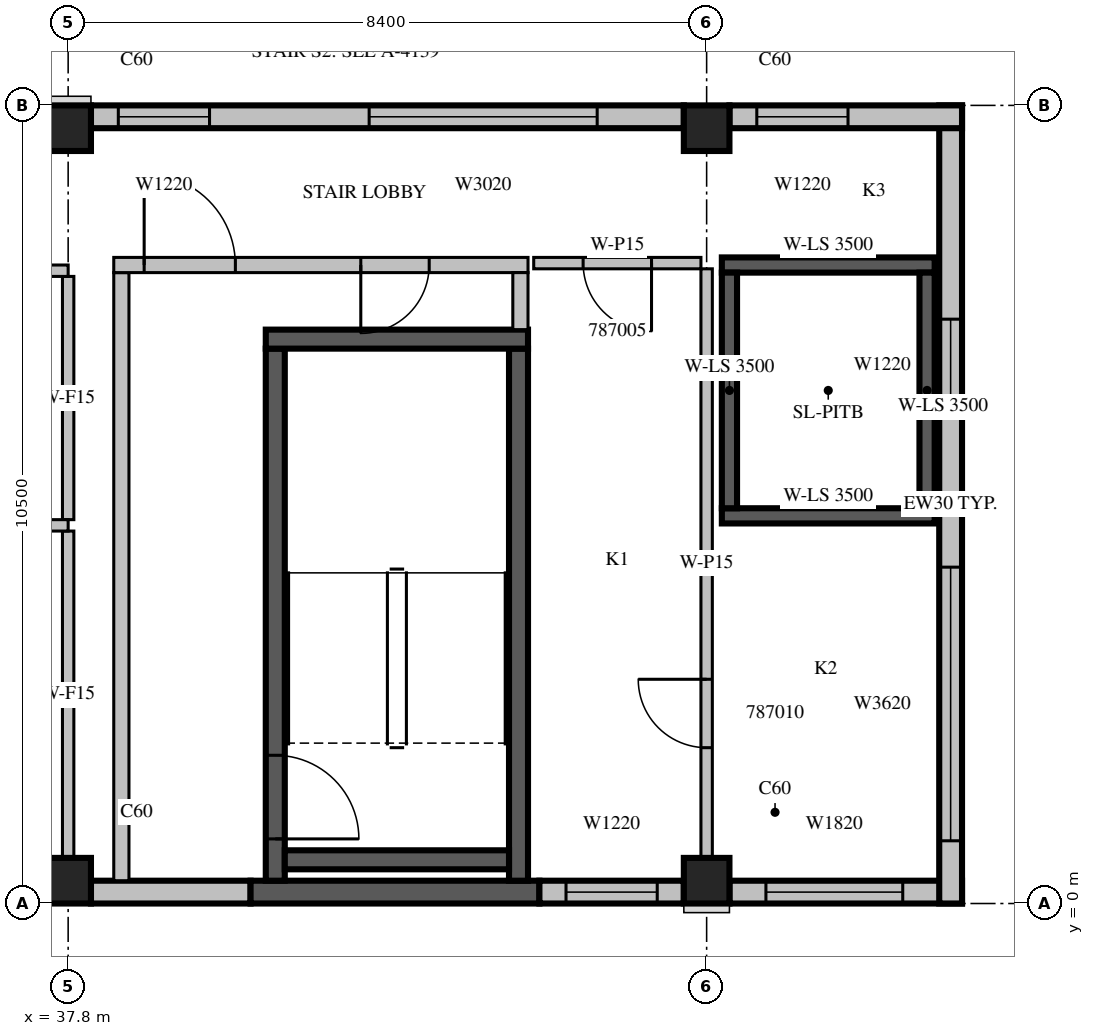
"""IFC4 building model, lengths in metres.
Left out: names, types, materials, properties, quantities, classifications, styles, units other than length and angle.
Written with IfcOpenShell. Run it as: python <this file> out.ifc"""

import sys

from ifc_helpers import new_model, si_unit, direction, frame, frame_2d, origin, origin_2d, place, context, subcontext, project, spatial, rectangle, extrude, source, transform, mapped, element, fill, save


model = new_model("IFC4")
c1 = context("Model", 3, precision=1e-05, world=origin(), true_north=direction((0.0, 1.0)))
c2 = subcontext(c1, "Body", "Model", "MODEL_VIEW")
j1 = project(units=[si_unit("LENGTHUNIT", "METRE"), si_unit("PLANEANGLEUNIT", "RADIAN")], contexts=[c1])
p1 = place(None, origin())
s1 = spatial("IfcSite", under=j1, at=p1, CompositionType="ELEMENT")
p2 = place(p1, origin())
s2 = spatial("IfcBuilding", under=s1, at=p2, CompositionType="ELEMENT")
p3 = place(p2, frame((0.0, 0.0, 365.0)))
s3 = spatial("IfcBuildingStorey", under=s2, at=p3, CompositionType="ELEMENT", Elevation=365.0)
m1 = source(origin(), c2, "Body", "SweptSolid", [
    extrude(rectangle(XDim=0.6, YDim=0.6, at=origin_2d()), origin(), (0.0, 0.0, 1.0), 3.5),
])
for number, where, z_axis, x_axis in (
    (1, (37.8, 0.3, 0.0), (0.0, 0.0, 1.0), (1.0, 0.0, 0.0)),
    (2, (46.2, 0.3, 0.0), (0.0, 0.0, 1.0), (1.0, 0.0, 0.0)),
    (3, (37.8, 10.2, 0.0), (0.0, 0.0, 1.0), (1.0, 0.0, 0.0)),
    (4, (46.2, 10.2, 0.0), (0.0, 0.0, 1.0), (1.0, 0.0, 0.0)),
):
    element("IfcColumn", number, at=place(p3, frame(where, z_axis=z_axis, x_axis=x_axis)), inside=s3, PredefinedType="COLUMN", context=c2, shape_type="MappedRepresentation", body=[
        mapped(m1, transform((0.0, 0.0, 0.0), scale=1.0)),
    ])
p4 = place(p3, frame((38.1, 0.15, 0.0), z_axis=(0.0, 0.0, 1.0), x_axis=(1.0, 0.0, 0.0)))
e5 = element("IfcWall", 5, at=p4, inside=s3, PredefinedType="STANDARD", context=c2, shape_type="SweptSolid", body=[
    extrude(rectangle(XDim=2.1, YDim=0.3, at=frame_2d((1.05, 0.0))), origin(), (0.0, 0.0, 1.0), 3.05),
])
p5 = place(p3, frame((40.2, 0.15, 0.0), z_axis=(0.0, 0.0, 1.0), x_axis=(1.0, 0.0, 0.0)))
e6 = element("IfcWall", 6, at=p5, inside=s3, PredefinedType="SOLIDWALL", context=c2, shape_type="SweptSolid", body=[
    extrude(rectangle(XDim=3.8, YDim=0.3, at=frame_2d((1.9, 0.0))), origin(), (0.0, 0.0, 1.0), 3.05),
])
p6 = place(p3, frame((44.0, 0.15, 0.0), z_axis=(0.0, 0.0, 1.0), x_axis=(1.0, 0.0, 0.0)))
e7 = element("IfcWall", 7, at=p6, inside=s3, PredefinedType="STANDARD", context=c2, shape_type="SweptSolid", body=[
    extrude(rectangle(XDim=1.9, YDim=0.3, at=frame_2d((0.95, 0.0))), origin(), (0.0, 0.0, 1.0), 3.05),
])
m2 = source(origin(), c2, "Body", "SweptSolid", [
    extrude(rectangle(XDim=1.2, YDim=2.0, at=frame_2d((0.6, 1.0))), frame((0.0, 0.16, 0.0), z_axis=(0.0, -1.0, 0.0), x_axis=(1.0, 0.0, 0.0)), (0.0, 0.0, 1.0), 0.32),
])
p7 = place(p6, frame((0.35, 0.0, 0.6)))
e8 = element("IfcOpeningElement", 8, at=p7, cuts=e7, PredefinedType="OPENING", context=c2, shape_type="MappedRepresentation", body=[
    mapped(m2, transform((0.0, 0.0, 0.0), scale=1.0)),
])
p8 = place(p3, frame((46.5, 0.15, 0.0), z_axis=(0.0, 0.0, 1.0), x_axis=(1.0, 0.0, 0.0)))
e9 = element("IfcWall", 9, at=p8, inside=s3, PredefinedType="STANDARD", context=c2, shape_type="SweptSolid", body=[
    extrude(rectangle(XDim=3.06, YDim=0.3, at=frame_2d((1.53, 0.0))), origin(), (0.0, 0.0, 1.0), 3.05),
])
m3 = source(origin(), c2, "Body", "SweptSolid", [
    extrude(rectangle(XDim=1.8, YDim=2.0, at=frame_2d((0.9, 1.0))), frame((0.0, 0.16, 0.0), z_axis=(0.0, -1.0, 0.0), x_axis=(1.0, 0.0, 0.0)), (0.0, 0.0, 1.0), 0.32),
])
p9 = place(p8, frame((0.48, 0.0, 0.6)))
e10 = element("IfcOpeningElement", 10, at=p9, cuts=e9, PredefinedType="OPENING", context=c2, shape_type="MappedRepresentation", body=[
    mapped(m3, transform((0.0, 0.0, 0.0), scale=1.0)),
])
p10 = place(p3, frame((49.41, 0.0, 0.0), z_axis=(0.0, 0.0, 1.0), x_axis=(0.0, 1.0, 0.0)))
e11 = element("IfcWall", 11, at=p10, inside=s3, PredefinedType="STANDARD", context=c2, shape_type="SweptSolid", body=[
    extrude(rectangle(XDim=10.5, YDim=0.3, at=frame_2d((5.25, 0.0))), origin(), (0.0, 0.0, 1.0), 3.05),
])
m4 = source(origin(), c2, "Body", "SweptSolid", [
    extrude(rectangle(XDim=3.6, YDim=2.0, at=frame_2d((1.8, 1.0))), frame((0.0, 0.16, 0.0), z_axis=(0.0, -1.0, 0.0), x_axis=(1.0, 0.0, 0.0)), (0.0, 0.0, 1.0), 0.32),
])
p11 = place(p10, frame((0.825, 0.0, 0.6)))
e12 = element("IfcOpeningElement", 12, at=p11, cuts=e11, PredefinedType="OPENING", context=c2, shape_type="MappedRepresentation", body=[
    mapped(m4, transform((0.0, 0.0, 0.0), scale=1.0)),
])
p12 = place(p10, frame((6.487, 0.0, 0.6)))
e13 = element("IfcOpeningElement", 13, at=p12, cuts=e11, PredefinedType="OPENING", context=c2, shape_type="MappedRepresentation", body=[
    mapped(m2, transform((0.0, 0.0, 0.0), scale=1.0)),
])
m5 = source(origin(), c2, "Body", "SweptSolid", [
    extrude(rectangle(XDim=3.06, YDim=0.3, at=frame_2d((1.53, 0.0))), origin(), (0.0, 0.0, 1.0), 3.05),
])
p13 = place(p3, frame((49.56, 10.35, 0.0), z_axis=(0.0, 0.0, 1.0), x_axis=(-1.0, 0.0, 0.0)))
e14 = element("IfcWall", 14, at=p13, inside=s3, PredefinedType="STANDARD", context=c2, shape_type="MappedRepresentation", body=[
    mapped(m5, transform((0.0, 0.0, 0.0), scale=1.0)),
])
p14 = place(p13, frame((1.5, 0.0, 0.6)))
e15 = element("IfcOpeningElement", 15, at=p14, cuts=e14, PredefinedType="OPENING", context=c2, shape_type="MappedRepresentation", body=[
    mapped(m2, transform((0.0, 0.0, 0.0), scale=1.0)),
])
m6 = source(origin(), c2, "Body", "SweptSolid", [
    extrude(rectangle(XDim=7.8, YDim=0.3, at=frame_2d((3.9, 0.0))), origin(), (0.0, 0.0, 1.0), 3.05),
])
p15 = place(p3, frame((45.9, 10.35, 0.0), z_axis=(0.0, 0.0, 1.0), x_axis=(-1.0, 0.0, 0.0)))
e16 = element("IfcWall", 16, at=p15, inside=s3, PredefinedType="STANDARD", context=c2, shape_type="MappedRepresentation", body=[
    mapped(m6, transform((0.0, 0.0, 0.0), scale=1.0)),
])
m7 = source(origin(), c2, "Body", "SweptSolid", [
    extrude(rectangle(XDim=3.0, YDim=2.0, at=frame_2d((1.5, 1.0))), frame((0.0, 0.16, 0.0), z_axis=(0.0, -1.0, 0.0), x_axis=(1.0, 0.0, 0.0)), (0.0, 0.0, 1.0), 0.32),
])
p16 = place(p15, frame((1.14, 0.0, 0.6)))
e17 = element("IfcOpeningElement", 17, at=p16, cuts=e16, PredefinedType="OPENING", context=c2, shape_type="MappedRepresentation", body=[
    mapped(m7, transform((0.0, 0.0, 0.0), scale=1.0)),
])
p17 = place(p15, frame((6.24, 0.0, 0.6)))
e18 = element("IfcOpeningElement", 18, at=p17, cuts=e16, PredefinedType="OPENING", context=c2, shape_type="MappedRepresentation", body=[
    mapped(m2, transform((0.0, 0.0, 0.0), scale=1.0)),
])
p18 = place(p3, frame((46.4, 5.1, 0.0), z_axis=(0.0, 0.0, 1.0), x_axis=(1.0, 0.0, 0.0)))
e19 = element("IfcWall", 19, at=p18, inside=s3, PredefinedType="SOLIDWALL", context=c2, shape_type="SweptSolid", body=[
    extrude(rectangle(XDim=2.8, YDim=0.2, at=frame_2d((1.4, 0.0))), origin(), (0.0, 0.0, 1.0), 3.5),
])
m8 = source(origin(), c2, "Body", "SweptSolid", [
    extrude(rectangle(XDim=2.8, YDim=0.2, at=frame_2d((1.4, 0.0))), origin(), (0.0, 0.0, 1.0), 3.5),
])
p19 = place(p3, frame((46.4, 8.4, 0.0), z_axis=(0.0, 0.0, 1.0), x_axis=(1.0, 0.0, 0.0)))
e20 = element("IfcWall", 20, at=p19, inside=s3, PredefinedType="SOLIDWALL", context=c2, shape_type="MappedRepresentation", body=[
    mapped(m8, transform((0.0, 0.0, 0.0), scale=1.0)),
])
m9 = source(origin(), c2, "Body", "SweptSolid", [
    extrude(rectangle(XDim=3.1, YDim=0.2, at=frame_2d((1.55, 0.0))), origin(), (0.0, 0.0, 1.0), 3.5),
])
for number, where, z_axis, x_axis in (
    (21, (46.5, 5.2, 0.0), (0.0, 0.0, 1.0), (0.0, 1.0, 0.0)),
    (22, (49.1, 5.2, 0.0), (0.0, 0.0, 1.0), (0.0, 1.0, 0.0)),
):
    element("IfcWall", number, at=place(p3, frame(where, z_axis=z_axis, x_axis=x_axis)), inside=s3, PredefinedType="SOLIDWALL", context=c2, shape_type="MappedRepresentation", body=[
        mapped(m9, transform((0.0, 0.0, 0.0), scale=1.0)),
    ])
p20 = place(p3, frame((40.525, 0.3, 0.0), z_axis=(0.0, 0.0, 1.0), x_axis=(0.0, 1.0, 0.0)))
e23 = element("IfcWall", 23, at=p20, inside=s3, PredefinedType="SOLIDWALL", context=c2, shape_type="SweptSolid", body=[
    extrude(rectangle(XDim=7.0, YDim=0.25, at=frame_2d((3.5, 0.0))), origin(), (0.0, 0.0, 1.0), 3.05),
])
m10 = source(origin(), c2, "Body", "SweptSolid", [
    extrude(rectangle(XDim=1.1, YDim=2.1, at=frame_2d((0.55, 1.05))), frame((0.0, 0.135, 0.0), z_axis=(0.0, -1.0, 0.0), x_axis=(1.0, 0.0, 0.0)), (0.0, 0.0, 1.0), 0.27),
])
p21 = place(p20, frame((0.55, 0.0, 0.0)))
e24 = element("IfcOpeningElement", 24, at=p21, cuts=e23, PredefinedType="OPENING", context=c2, shape_type="MappedRepresentation", body=[
    mapped(m10, transform((0.0, 0.0, 0.0), scale=1.0)),
])
m11 = source(origin(), c2, "Body", "SweptSolid", [
    extrude(rectangle(XDim=7.0, YDim=0.25, at=frame_2d((3.5, 0.0))), origin(), (0.0, 0.0, 1.0), 3.05),
])
p22 = place(p3, frame((43.725, 0.3, 0.0), z_axis=(0.0, 0.0, 1.0), x_axis=(0.0, 1.0, 0.0)))
e25 = element("IfcWall", 25, at=p22, inside=s3, PredefinedType="SOLIDWALL", context=c2, shape_type="MappedRepresentation", body=[
    mapped(m11, transform((0.0, 0.0, 0.0), scale=1.0)),
])
p23 = place(p3, frame((40.4, 7.425, 0.0), z_axis=(0.0, 0.0, 1.0), x_axis=(1.0, 0.0, 0.0)))
e26 = element("IfcWall", 26, at=p23, inside=s3, PredefinedType="SOLIDWALL", context=c2, shape_type="SweptSolid", body=[
    extrude(rectangle(XDim=3.45, YDim=0.25, at=frame_2d((1.725, 0.0))), origin(), (0.0, 0.0, 1.0), 3.05),
])
p24 = place(p3, frame((40.65, 0.575, 0.0), z_axis=(0.0, 0.0, 1.0), x_axis=(1.0, 0.0, 0.0)))
e27 = element("IfcWall", 27, at=p24, inside=s3, PredefinedType="SOLIDWALL", context=c2, shape_type="SweptSolid", body=[
    extrude(rectangle(XDim=2.95, YDim=0.25, at=frame_2d((1.475, 0.0))), origin(), (0.0, 0.0, 1.0), 3.05),
])
p25 = place(p3, frame((38.5, 0.3, 0.0), z_axis=(0.0, 0.0, 1.0), x_axis=(0.0, 1.0, 0.0)))
e28 = element("IfcWall", 28, at=p25, inside=s3, PredefinedType="PARTITIONING", context=c2, shape_type="SweptSolid", body=[
    extrude(rectangle(XDim=8.0, YDim=0.2, at=frame_2d((4.0, 0.0))), origin(), (0.0, 0.0, 1.0), 3.05),
])
p26 = place(p3, frame((38.4, 8.4, 0.0), z_axis=(0.0, 0.0, 1.0), x_axis=(1.0, 0.0, 0.0)))
e29 = element("IfcWall", 29, at=p26, inside=s3, PredefinedType="PARTITIONING", context=c2, shape_type="SweptSolid", body=[
    extrude(rectangle(XDim=5.45, YDim=0.2, at=frame_2d((2.725, 0.0))), origin(), (0.0, 0.0, 1.0), 3.05),
])
m12 = source(origin(), c2, "Body", "SweptSolid", [
    extrude(rectangle(XDim=1.2, YDim=2.1, at=frame_2d((0.6, 1.05))), frame((0.0, 0.11, 0.0), z_axis=(0.0, -1.0, 0.0), x_axis=(1.0, 0.0, 0.0)), (0.0, 0.0, 1.0), 0.22),
])
p27 = place(p26, frame((0.4, 0.0, 0.0)))
e30 = element("IfcOpeningElement", 30, at=p27, cuts=e29, PredefinedType="OPENING", context=c2, shape_type="MappedRepresentation", body=[
    mapped(m12, transform((0.0, 0.0, 0.0), scale=1.0)),
])
m13 = source(origin(), c2, "Body", "SweptSolid", [
    extrude(rectangle(XDim=0.9, YDim=2.1, at=frame_2d((0.45, 1.05))), frame((0.0, 0.11, 0.0), z_axis=(0.0, -1.0, 0.0), x_axis=(1.0, 0.0, 0.0)), (0.0, 0.0, 1.0), 0.22),
])
p28 = place(p26, frame((3.25, 0.0, 0.0)))
e31 = element("IfcOpeningElement", 31, at=p28, cuts=e29, PredefinedType="OPENING", context=c2, shape_type="MappedRepresentation", body=[
    mapped(m13, transform((0.0, 0.0, 0.0), scale=1.0)),
])
p29 = place(p3, frame((43.75, 7.55, 0.0), z_axis=(0.0, 0.0, 1.0), x_axis=(0.0, 1.0, 0.0)))
e32 = element("IfcWall", 32, at=p29, inside=s3, PredefinedType="PARTITIONING", context=c2, shape_type="SweptSolid", body=[
    extrude(rectangle(XDim=0.75, YDim=0.2, at=frame_2d((0.375, 0.0))), origin(), (0.0, 0.0, 1.0), 3.05),
])
p30 = place(p3, frame((46.125, 8.425, 0.0), z_axis=(0.0, 0.0, 1.0), x_axis=(-1.0, 0.0, 0.0)))
e33 = element("IfcWall", 33, at=p30, inside=s3, PredefinedType="PARTITIONING", context=c2, shape_type="SweptSolid", body=[
    extrude(rectangle(XDim=2.2, YDim=0.15, at=frame_2d((1.1, 0.0))), origin(), (0.0, 0.0, 1.0), 3.05),
])
m14 = source(origin(), c2, "Body", "SweptSolid", [
    extrude(rectangle(XDim=0.9, YDim=2.1, at=frame_2d((0.45, 1.05))), frame((0.0, 0.085, 0.0), z_axis=(0.0, -1.0, 0.0), x_axis=(1.0, 0.0, 0.0)), (0.0, 0.0, 1.0), 0.17),
])
p31 = place(p30, frame((0.65, 0.0, 0.0)))
e34 = element("IfcOpeningElement", 34, at=p31, cuts=e33, PredefinedType="OPENING", context=c2, shape_type="MappedRepresentation", body=[
    mapped(m14, transform((0.0, 0.0, 0.0), scale=1.0)),
])
p32 = place(p3, frame((37.8, 0.599, 0.0), z_axis=(0.0, 0.0, 1.0), x_axis=(0.0, 1.0, 0.0)))
e35 = element("IfcWall", 35, at=p32, inside=s3, PredefinedType="PARTITIONING", context=c2, shape_type="SweptSolid", body=[
    extrude(rectangle(XDim=4.301, YDim=0.15, at=frame_2d((2.151, 0.0))), origin(), (0.0, 0.0, 1.0), 3.05),
])
m15 = source(origin(), c2, "Body", "SweptSolid", [
    extrude(rectangle(XDim=3.2, YDim=0.15, at=frame_2d((1.6, 0.0))), origin(), (0.0, 0.0, 1.0), 3.05),
])
p33 = place(p3, frame((37.8, 5.05, 0.0), z_axis=(0.0, 0.0, 1.0), x_axis=(0.0, 1.0, 0.0)))
e36 = element("IfcWall", 36, at=p33, inside=s3, PredefinedType="PARTITIONING", context=c2, shape_type="MappedRepresentation", body=[
    mapped(m15, transform((0.0, 0.0, 0.0), scale=1.0)),
])
p34 = place(p3, frame((37.8, 4.975, 0.0), z_axis=(0.0, 0.0, 1.0), x_axis=(-1.0, 0.0, 0.0)))
e37 = element("IfcWall", 37, at=p34, inside=s3, PredefinedType="PARTITIONING", context=c2, shape_type="SweptSolid", body=[
    extrude(rectangle(XDim=8.4, YDim=0.15, at=frame_2d((4.2, 0.0))), origin(), (0.0, 0.0, 1.0), 3.05),
])
m16 = source(origin(), c2, "Body", "SweptSolid", [
    extrude(rectangle(XDim=1.0, YDim=2.1, at=frame_2d((0.5, 1.05))), frame((0.0, 0.085, 0.0), z_axis=(0.0, -1.0, 0.0), x_axis=(1.0, 0.0, 0.0)), (0.0, 0.0, 1.0), 0.17),
])
p35 = place(p34, frame((3.608, 0.0, 0.0)))
e38 = element("IfcOpeningElement", 38, at=p35, cuts=e37, PredefinedType="OPENING", context=c2, shape_type="MappedRepresentation", body=[
    mapped(m16, transform((0.0, 0.0, 0.0), scale=1.0)),
])
p36 = place(p3, frame((46.2, 8.35, 0.0), z_axis=(0.0, 0.0, 1.0), x_axis=(0.0, -1.0, 0.0)))
e39 = element("IfcWall", 39, at=p36, inside=s3, PredefinedType="PARTITIONING", context=c2, shape_type="SweptSolid", body=[
    extrude(rectangle(XDim=7.751, YDim=0.15, at=frame_2d((3.876, 0.0))), origin(), (0.0, 0.0, 1.0), 3.05),
])
p37 = place(p36, frame((5.4, 0.0, 0.0)))
e40 = element("IfcOpeningElement", 40, at=p37, cuts=e39, PredefinedType="OPENING", context=c2, shape_type="MappedRepresentation", body=[
    mapped(m14, transform((0.0, 0.0, 0.0), scale=1.0)),
])
m17 = source(origin(), c2, "Body", "SweptSolid", [
    extrude(rectangle(XDim=8.4, YDim=0.15, at=frame_2d((4.2, 0.0))), origin(), (0.0, 0.0, 1.0), 3.05),
])
p38 = place(p3, frame((37.8, 8.325, 0.0), z_axis=(0.0, 0.0, 1.0), x_axis=(-1.0, 0.0, 0.0)))
e41 = element("IfcWall", 41, at=p38, inside=s3, PredefinedType="PARTITIONING", context=c2, shape_type="MappedRepresentation", body=[
    mapped(m17, transform((0.0, 0.0, 0.0), scale=1.0)),
])
p39 = place(p38, frame((3.658, 0.0, 0.0)))
e42 = element("IfcOpeningElement", 42, at=p39, cuts=e41, PredefinedType="OPENING", context=c2, shape_type="MappedRepresentation", body=[
    mapped(m16, transform((0.0, 0.0, 0.0), scale=1.0)),
])
m18 = source(origin(), c2, "Body", "SweptSolid", [
    extrude(rectangle(XDim=1.2, YDim=2.0, at=frame_2d((0.6, 1.0))), frame((0.0, 0.03, 0.0), z_axis=(0.0, -1.0, 0.0), x_axis=(1.0, 0.0, 0.0)), (0.0, 0.0, 1.0), 0.06),
])
p40 = place(p7, origin())
e43 = element("IfcWindow", 43, at=p40, inside=s3, PartitioningType="SINGLE_PANEL", PredefinedType="WINDOW", context=c2, shape_type="MappedRepresentation", body=[
    mapped(m18, transform((0.0, 0.0, 0.0), scale=1.0)),
])
fill(e8, e43)
m19 = source(origin(), c2, "Body", "SweptSolid", [
    extrude(rectangle(XDim=1.8, YDim=2.0, at=frame_2d((0.9, 1.0))), frame((0.0, 0.03, 0.0), z_axis=(0.0, -1.0, 0.0), x_axis=(1.0, 0.0, 0.0)), (0.0, 0.0, 1.0), 0.06),
])
p41 = place(p9, origin())
e44 = element("IfcWindow", 44, at=p41, inside=s3, PartitioningType="SINGLE_PANEL", PredefinedType="WINDOW", context=c2, shape_type="MappedRepresentation", body=[
    mapped(m19, transform((0.0, 0.0, 0.0), scale=1.0)),
])
fill(e10, e44)
m20 = source(origin(), c2, "Body", "SweptSolid", [
    extrude(rectangle(XDim=3.6, YDim=2.0, at=frame_2d((1.8, 1.0))), frame((0.0, 0.03, 0.0), z_axis=(0.0, -1.0, 0.0), x_axis=(1.0, 0.0, 0.0)), (0.0, 0.0, 1.0), 0.06),
])
p42 = place(p11, origin())
e45 = element("IfcWindow", 45, at=p42, inside=s3, PartitioningType="SINGLE_PANEL", PredefinedType="WINDOW", context=c2, shape_type="MappedRepresentation", body=[
    mapped(m20, transform((0.0, 0.0, 0.0), scale=1.0)),
])
fill(e12, e45)
p43 = place(p12, origin())
e46 = element("IfcWindow", 46, at=p43, inside=s3, PartitioningType="SINGLE_PANEL", PredefinedType="WINDOW", context=c2, shape_type="MappedRepresentation", body=[
    mapped(m18, transform((0.0, 0.0, 0.0), scale=1.0)),
])
fill(e13, e46)
p44 = place(p14, origin())
e47 = element("IfcWindow", 47, at=p44, inside=s3, PartitioningType="SINGLE_PANEL", PredefinedType="WINDOW", context=c2, shape_type="MappedRepresentation", body=[
    mapped(m18, transform((0.0, 0.0, 0.0), scale=1.0)),
])
fill(e15, e47)
m21 = source(origin(), c2, "Body", "SweptSolid", [
    extrude(rectangle(XDim=3.0, YDim=2.0, at=frame_2d((1.5, 1.0))), frame((0.0, 0.03, 0.0), z_axis=(0.0, -1.0, 0.0), x_axis=(1.0, 0.0, 0.0)), (0.0, 0.0, 1.0), 0.06),
])
p45 = place(p16, origin())
e48 = element("IfcWindow", 48, at=p45, inside=s3, PartitioningType="SINGLE_PANEL", PredefinedType="WINDOW", context=c2, shape_type="MappedRepresentation", body=[
    mapped(m21, transform((0.0, 0.0, 0.0), scale=1.0)),
])
fill(e17, e48)
p46 = place(p17, origin())
e49 = element("IfcWindow", 49, at=p46, inside=s3, PartitioningType="SINGLE_PANEL", PredefinedType="WINDOW", context=c2, shape_type="MappedRepresentation", body=[
    mapped(m18, transform((0.0, 0.0, 0.0), scale=1.0)),
])
fill(e18, e49)
m22 = source(origin(), c2, "Body", "SweptSolid", [
    extrude(rectangle(XDim=1.1, YDim=2.1, at=frame_2d((0.55, 1.05))), frame((0.0, 0.025, 0.0), z_axis=(0.0, -1.0, 0.0), x_axis=(1.0, 0.0, 0.0)), (0.0, 0.0, 1.0), 0.05),
])
p47 = place(p21, origin())
e50 = element("IfcDoor", 50, at=p47, inside=s3, OperationType="SINGLE_SWING_RIGHT", PredefinedType="DOOR", context=c2, shape_type="MappedRepresentation", body=[
    mapped(m22, transform((0.0, 0.0, 0.0), scale=1.0)),
])
fill(e24, e50)
m23 = source(origin(), c2, "Body", "SweptSolid", [
    extrude(rectangle(XDim=1.2, YDim=2.1, at=frame_2d((0.6, 1.05))), frame((0.0, 0.025, 0.0), z_axis=(0.0, -1.0, 0.0), x_axis=(1.0, 0.0, 0.0)), (0.0, 0.0, 1.0), 0.05),
])
p48 = place(p27, origin())
e51 = element("IfcDoor", 51, at=p48, inside=s3, OperationType="SINGLE_SWING_LEFT", PredefinedType="DOOR", context=c2, shape_type="MappedRepresentation", body=[
    mapped(m23, transform((0.0, 0.0, 0.0), scale=1.0)),
])
fill(e30, e51)
m24 = source(origin(), c2, "Body", "SweptSolid", [
    extrude(rectangle(XDim=0.9, YDim=2.1, at=frame_2d((0.45, 1.05))), frame((0.0, 0.025, 0.0), z_axis=(0.0, -1.0, 0.0), x_axis=(1.0, 0.0, 0.0)), (0.0, 0.0, 1.0), 0.05),
])
p49 = place(p28, origin())
e52 = element("IfcDoor", 52, at=p49, inside=s3, OperationType="SINGLE_SWING_RIGHT", PredefinedType="DOOR", context=c2, shape_type="MappedRepresentation", body=[
    mapped(m24, transform((0.0, 0.0, 0.0), scale=1.0)),
])
fill(e31, e52)
p50 = place(p31, origin())
e53 = element("IfcDoor", 53, at=p50, inside=s3, OperationType="SINGLE_SWING_LEFT", PredefinedType="DOOR", context=c2, shape_type="MappedRepresentation", body=[
    mapped(m24, transform((0.0, 0.0, 0.0), scale=1.0)),
])
fill(e34, e53)
p51 = place(p37, origin())
e54 = element("IfcDoor", 54, at=p51, inside=s3, OperationType="SINGLE_SWING_RIGHT", PredefinedType="DOOR", context=c2, shape_type="MappedRepresentation", body=[
    mapped(m24, transform((0.0, 0.0, 0.0), scale=1.0)),
])
fill(e40, e54)
save(model, sys.argv[1])
